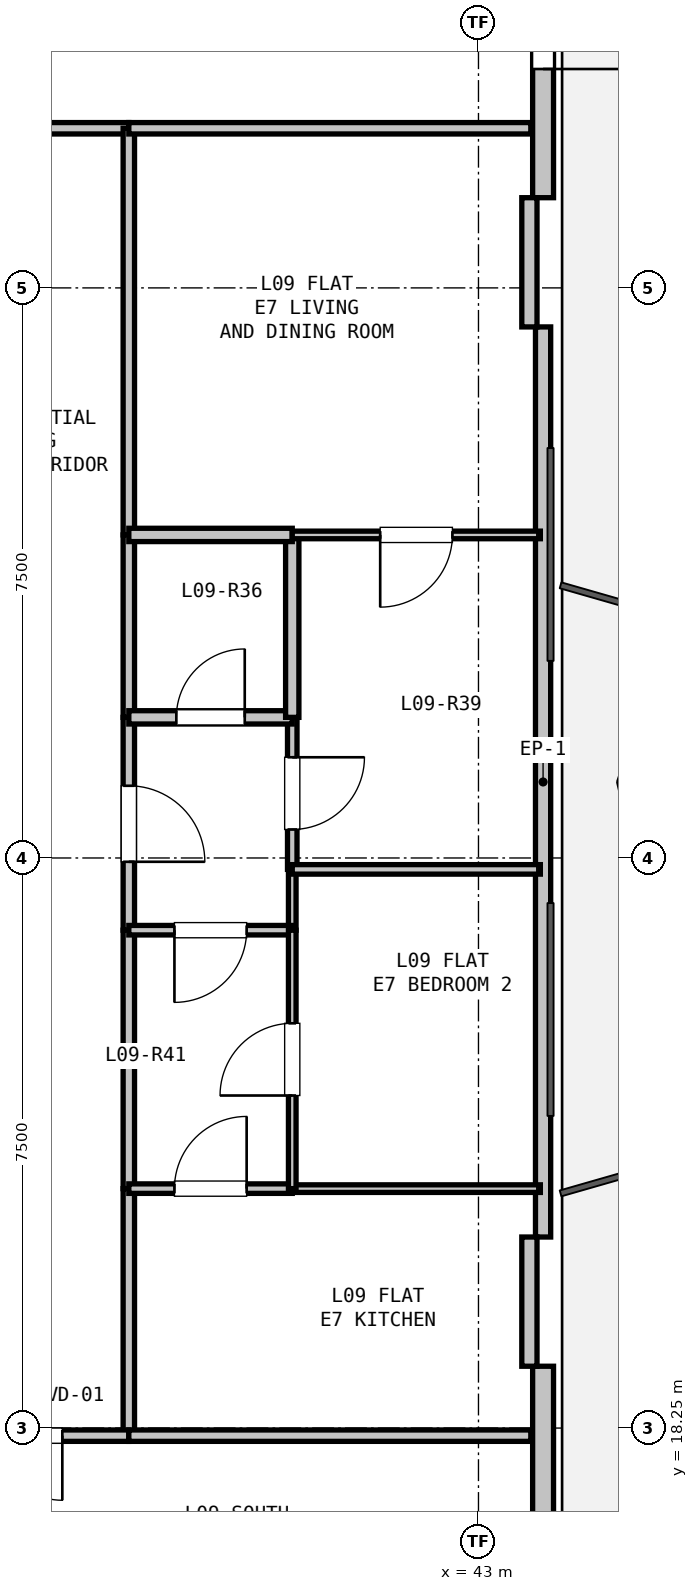
"""IFC4 building model, lengths in metres.
Left out: names, types, materials, properties, quantities, classifications, styles, units other than length and angle.
Written with IfcOpenShell. Run it as: python <this file> out.ifc"""

import sys

from ifc_helpers import new_model, si_unit, direction, frame, frame_2d, origin, place, context, subcontext, project, spatial, rectangle, extrude, element, fill, save


model = new_model("IFC4")
c1 = context("Model", 3, precision=1e-05, world=origin(), true_north=direction((0.0, 1.0)))
c2 = subcontext(c1, "Body", "Model", "MODEL_VIEW")
j1 = project(units=[si_unit("LENGTHUNIT", "METRE"), si_unit("PLANEANGLEUNIT", "RADIAN")], contexts=[c1])
p1 = place(None, origin())
s1 = spatial("IfcSite", under=j1, at=p1, CompositionType="ELEMENT")
p2 = place(p1, origin())
s2 = spatial("IfcBuilding", under=s1, at=p2, CompositionType="ELEMENT")
p3 = place(p2, frame((0.0, 0.0, 35.7)))
s3 = spatial("IfcBuildingStorey", under=s2, at=p3, CompositionType="ELEMENT", Elevation=35.7)
p4 = place(p3, frame((43.85, 47.11, 0.0), z_axis=(0.0, 0.0, 1.0), x_axis=(0.0, -1.0, 0.0)))
e1 = element("IfcWall", 1, at=p4, inside=s3, PredefinedType="SOLIDWALL", context=c2, shape_type="SweptSolid", body=[
    extrude(rectangle(XDim=12.673, YDim=0.275, at=frame_2d((6.336, 0.0))), origin(), (0.0, 0.0, 1.0), 2.66),
])
p5 = place(p4, frame((9.88, 0.0, 0.0)))
e2 = element("IfcOpeningElement", 2, at=p5, cuts=e1, PredefinedType="OPENING", context=c2, shape_type="SweptSolid", body=[
    extrude(rectangle(XDim=1.1, YDim=2.1, at=frame_2d((0.55, 1.05))), frame((0.0, 0.147, 0.0), z_axis=(0.0, -1.0, 0.0), x_axis=(1.0, 0.0, 0.0)), (0.0, 0.0, 1.0), 0.295),
])
p6 = place(p3, frame((43.85, 32.737, 0.0), z_axis=(0.0, 0.0, 1.0), x_axis=(0.0, -1.0, 0.0)))
e3 = element("IfcWall", 3, at=p6, inside=s3, PredefinedType="PARAPET", context=c2, shape_type="SweptSolid", body=[
    extrude(rectangle(XDim=11.973, YDim=0.2, at=frame_2d((5.987, 0.0))), origin(), (0.0, 0.0, 1.0), 0.2),
])
p7 = place(p3, frame((43.85, 19.063, 0.0), z_axis=(0.0, 0.0, 1.0), x_axis=(0.0, -1.0, 0.0)))
e4 = element("IfcWall", 4, at=p7, inside=s3, PredefinedType="SOLIDWALL", context=c2, shape_type="SweptSolid", body=[
    extrude(rectangle(XDim=12.673, YDim=0.275, at=frame_2d((6.336, 0.0))), origin(), (0.0, 0.0, 1.0), 2.66),
])
for number, where, z_axis, x_axis in (
    (5, (43.67, 34.437, 0.0), (0.0, 0.0, 1.0), (0.0, -1.0, 0.0)),
    (6, (43.67, 20.763, 0.0), (0.0, 0.0, 1.0), (0.0, -1.0, 0.0)),
):
    element("IfcWall", number, at=place(p3, frame(where, z_axis=z_axis, x_axis=x_axis)), inside=s3, PredefinedType="PARAPET", context=c2, shape_type="SweptSolid", body=[
        extrude(rectangle(XDim=1.7, YDim=0.2, at=frame_2d((0.85, 0.0))), origin(), (0.0, 0.0, 1.0), 2.66),
    ])
p8 = place(p3, frame((35.8, 35.35, 0.0), z_axis=(0.0, 0.0, 1.0), x_axis=(1.0, 0.0, 0.0)))
e7 = element("IfcWall", 7, at=p8, inside=s3, PredefinedType="PARTITIONING", context=c2, shape_type="SweptSolid", body=[
    extrude(rectangle(XDim=2.6, YDim=0.15, at=frame_2d((1.3, 0.0))), origin(), (0.0, 0.0, 1.0), 2.338),
])
p9 = place(p3, frame((38.4, 35.35, 0.0), z_axis=(0.0, 0.0, 1.0), x_axis=(0.0, -1.0, 0.0)))
e8 = element("IfcWall", 8, at=p9, inside=s3, PredefinedType="PARTITIONING", context=c2, shape_type="SweptSolid", body=[
    extrude(rectangle(XDim=5.35, YDim=0.15, at=frame_2d((2.675, 0.0))), origin(), (0.0, 0.0, 1.0), 2.338),
])
p10 = place(p3, frame((38.4, 30.0, 0.0), z_axis=(0.0, 0.0, 1.0), x_axis=(0.0, -1.0, 0.0)))
e9 = element("IfcWall", 9, at=p10, inside=s3, PredefinedType="PARTITIONING", context=c2, shape_type="SweptSolid", body=[
    extrude(rectangle(XDim=2.4, YDim=0.15, at=frame_2d((1.2, 0.0))), origin(), (0.0, 0.0, 1.0), 3.04),
])
p11 = place(p3, frame((38.4, 27.6, 0.0), z_axis=(0.0, 0.0, 1.0), x_axis=(0.0, -1.0, 0.0)))
e10 = element("IfcWall", 10, at=p11, inside=s3, PredefinedType="PARTITIONING", context=c2, shape_type="SweptSolid", body=[
    extrude(rectangle(XDim=2.8, YDim=0.15, at=frame_2d((1.4, 0.0))), origin(), (0.0, 0.0, 1.0), 3.04),
])
p12 = place(p11, frame((0.9, 0.0, 0.0)))
e11 = element("IfcOpeningElement", 11, at=p12, cuts=e10, PredefinedType="OPENING", context=c2, shape_type="SweptSolid", body=[
    extrude(rectangle(XDim=1.0, YDim=2.15, at=frame_2d((0.5, 1.075))), frame((0.0, 0.085, 0.0), z_axis=(0.0, -1.0, 0.0), x_axis=(1.0, 0.0, 0.0)), (0.0, 0.0, 1.0), 0.17),
])
p13 = place(p3, frame((38.4, 24.8, 0.0), z_axis=(0.0, 0.0, 1.0), x_axis=(0.0, -1.0, 0.0)))
e12 = element("IfcWall", 12, at=p13, inside=s3, PredefinedType="PARTITIONING", context=c2, shape_type="SweptSolid", body=[
    extrude(rectangle(XDim=3.4, YDim=0.15, at=frame_2d((1.7, 0.0))), origin(), (0.0, 0.0, 1.0), 3.04),
])
p14 = place(p3, frame((38.4, 21.4, 0.0), z_axis=(0.0, 0.0, 1.0), x_axis=(0.0, -1.0, 0.0)))
e13 = element("IfcWall", 13, at=p14, inside=s3, PredefinedType="PARTITIONING", context=c2, shape_type="SweptSolid", body=[
    extrude(rectangle(XDim=3.25, YDim=0.15, at=frame_2d((1.625, 0.0))), origin(), (0.0, 0.0, 1.0), 3.04),
])
p15 = place(p3, frame((38.4, 18.15, 0.0), z_axis=(0.0, 0.0, 1.0), x_axis=(-1.0, 0.0, 0.0)))
e14 = element("IfcWall", 14, at=p15, inside=s3, PredefinedType="PARTITIONING", context=c2, shape_type="SweptSolid", body=[
    extrude(rectangle(XDim=2.6, YDim=0.15, at=frame_2d((1.3, 0.0))), origin(), (0.0, 0.0, 1.0), 2.338),
])
p16 = place(p15, frame((0.875, 0.0, 0.0)))
e15 = element("IfcOpeningElement", 15, at=p16, cuts=e14, PredefinedType="OPENING", context=c2, shape_type="SweptSolid", body=[
    extrude(rectangle(XDim=0.85, YDim=2.1, at=frame_2d((0.425, 1.05))), frame((0.0, 0.085, 0.0), z_axis=(0.0, -1.0, 0.0), x_axis=(1.0, 0.0, 0.0)), (0.0, 0.0, 1.0), 0.17),
])
p17 = place(p3, frame((40.55, 27.6, 0.0), z_axis=(0.0, 0.0, 1.0), x_axis=(0.0, -1.0, 0.0)))
e16 = element("IfcWall", 16, at=p17, inside=s3, PredefinedType="PARTITIONING", context=c2, shape_type="SweptSolid", body=[
    extrude(rectangle(XDim=2.0, YDim=0.125, at=frame_2d((1.0, 0.0))), origin(), (0.0, 0.0, 1.0), 3.04),
])
p18 = place(p17, frame((0.525, 0.0, 0.0)))
e17 = element("IfcOpeningElement", 17, at=p18, cuts=e16, PredefinedType="OPENING", context=c2, shape_type="SweptSolid", body=[
    extrude(rectangle(XDim=0.95, YDim=2.1, at=frame_2d((0.475, 1.05))), frame((0.0, 0.073, 0.0), z_axis=(0.0, -1.0, 0.0), x_axis=(1.0, 0.0, 0.0)), (0.0, 0.0, 1.0), 0.145),
])
p19 = place(p3, frame((40.55, 25.6, 0.0), z_axis=(0.0, 0.0, 1.0), x_axis=(0.0, -1.0, 0.0)))
e18 = element("IfcWall", 18, at=p19, inside=s3, PredefinedType="PARTITIONING", context=c2, shape_type="SweptSolid", body=[
    extrude(rectangle(XDim=0.8, YDim=0.1, at=frame_2d((0.4, 0.0))), origin(), (0.0, 0.0, 1.0), 3.04),
])
p20 = place(p3, frame((40.55, 24.8, 0.0), z_axis=(0.0, 0.0, 1.0), x_axis=(-1.0, 0.0, 0.0)))
e19 = element("IfcWall", 19, at=p20, inside=s3, PredefinedType="PARTITIONING", context=c2, shape_type="SweptSolid", body=[
    extrude(rectangle(XDim=2.15, YDim=0.125, at=frame_2d((1.075, 0.0))), origin(), (0.0, 0.0, 1.0), 3.04),
])
p21 = place(p20, frame((0.6, 0.0, 0.0)))
e20 = element("IfcOpeningElement", 20, at=p21, cuts=e19, PredefinedType="OPENING", context=c2, shape_type="SweptSolid", body=[
    extrude(rectangle(XDim=0.95, YDim=2.1, at=frame_2d((0.475, 1.05))), frame((0.0, 0.073, 0.0), z_axis=(0.0, -1.0, 0.0), x_axis=(1.0, 0.0, 0.0)), (0.0, 0.0, 1.0), 0.145),
])
p22 = place(p3, frame((38.4, 27.6, 0.0), z_axis=(0.0, 0.0, 1.0), x_axis=(1.0, 0.0, 0.0)))
e21 = element("IfcWall", 21, at=p22, inside=s3, PredefinedType="PLUMBINGWALL", context=c2, shape_type="SweptSolid", body=[
    extrude(rectangle(XDim=2.15, YDim=0.175, at=frame_2d((1.075, 0.0))), origin(), (0.0, 0.0, 1.0), 3.04),
])
p23 = place(p22, frame((0.625, 0.0, 0.0)))
e22 = element("IfcOpeningElement", 22, at=p23, cuts=e21, PredefinedType="OPENING", context=c2, shape_type="SweptSolid", body=[
    extrude(rectangle(XDim=0.9, YDim=2.1, at=frame_2d((0.45, 1.05))), frame((0.0, 0.097, 0.0), z_axis=(0.0, -1.0, 0.0), x_axis=(1.0, 0.0, 0.0)), (0.0, 0.0, 1.0), 0.195),
])
p24 = place(p3, frame((43.688, 35.35, 0.0), z_axis=(0.0, 0.0, 1.0), x_axis=(-1.0, 0.0, 0.0)))
e23 = element("IfcWall", 23, at=p24, inside=s3, PredefinedType="PARTITIONING", context=c2, shape_type="SweptSolid", body=[
    extrude(rectangle(XDim=5.289, YDim=0.15, at=frame_2d((2.644, 0.0))), origin(), (0.0, 0.0, 1.0), 2.338),
])
p25 = place(p3, frame((40.55, 30.0, 0.0), z_axis=(0.0, 0.0, 1.0), x_axis=(0.0, -1.0, 0.0)))
e24 = element("IfcWall", 24, at=p25, inside=s3, PredefinedType="PLUMBINGWALL", context=c2, shape_type="SweptSolid", body=[
    extrude(rectangle(XDim=2.4, YDim=0.175, at=frame_2d((1.2, 0.0))), origin(), (0.0, 0.0, 1.0), 3.04),
])
p26 = place(p3, frame((38.4, 30.0, 0.0), z_axis=(0.0, 0.0, 1.0), x_axis=(1.0, 0.0, 0.0)))
e25 = element("IfcWall", 25, at=p26, inside=s3, PredefinedType="PLUMBINGWALL", context=c2, shape_type="SweptSolid", body=[
    extrude(rectangle(XDim=2.15, YDim=0.175, at=frame_2d((1.075, 0.0))), origin(), (0.0, 0.0, 1.0), 3.04),
])
p27 = place(p3, frame((38.4, 21.4, 0.0), z_axis=(0.0, 0.0, 1.0), x_axis=(1.0, 0.0, 0.0)))
e26 = element("IfcWall", 26, at=p27, inside=s3, PredefinedType="PARTITIONING", context=c2, shape_type="SweptSolid", body=[
    extrude(rectangle(XDim=2.15, YDim=0.125, at=frame_2d((1.075, 0.0))), origin(), (0.0, 0.0, 1.0), 3.04),
])
p28 = place(p27, frame((0.6, 0.0, 0.0)))
e27 = element("IfcOpeningElement", 27, at=p28, cuts=e26, PredefinedType="OPENING", context=c2, shape_type="SweptSolid", body=[
    extrude(rectangle(XDim=0.95, YDim=2.1, at=frame_2d((0.475, 1.05))), frame((0.0, 0.073, 0.0), z_axis=(0.0, -1.0, 0.0), x_axis=(1.0, 0.0, 0.0)), (0.0, 0.0, 1.0), 0.145),
])
p29 = place(p3, frame((40.55, 21.4, 0.0), z_axis=(0.0, 0.0, 1.0), x_axis=(1.0, 0.0, 0.0)))
e28 = element("IfcWall", 28, at=p29, inside=s3, PredefinedType="PARTITIONING", context=c2, shape_type="SweptSolid", body=[
    extrude(rectangle(XDim=3.264, YDim=0.1, at=frame_2d((1.632, 0.0))), origin(), (0.0, 0.0, 1.0), 2.365),
])
p30 = place(p3, frame((43.688, 18.15, 0.0), z_axis=(0.0, 0.0, 1.0), x_axis=(-1.0, 0.0, 0.0)))
e29 = element("IfcWall", 29, at=p30, inside=s3, PredefinedType="PARTITIONING", context=c2, shape_type="SweptSolid", body=[
    extrude(rectangle(XDim=5.289, YDim=0.15, at=frame_2d((2.644, 0.0))), origin(), (0.0, 0.0, 1.0), 2.365),
])
p31 = place(p3, frame((43.814, 30.0, 0.0), z_axis=(0.0, 0.0, 1.0), x_axis=(-1.0, 0.0, 0.0)))
e30 = element("IfcWall", 30, at=p31, inside=s3, PredefinedType="PARTITIONING", context=c2, shape_type="SweptSolid", body=[
    extrude(rectangle(XDim=3.264, YDim=0.1, at=frame_2d((1.632, 0.0))), origin(), (0.0, 0.0, 1.0), 2.365),
])
p32 = place(p31, frame((1.157, 0.0, 0.0)))
e31 = element("IfcOpeningElement", 31, at=p32, cuts=e30, PredefinedType="OPENING", context=c2, shape_type="SweptSolid", body=[
    extrude(rectangle(XDim=0.95, YDim=2.1, at=frame_2d((0.475, 1.05))), frame((0.0, 0.06, 0.0), z_axis=(0.0, -1.0, 0.0), x_axis=(1.0, 0.0, 0.0)), (0.0, 0.0, 1.0), 0.12),
])
p33 = place(p3, frame((43.814, 25.6, 0.0), z_axis=(0.0, 0.0, 1.0), x_axis=(-1.0, 0.0, 0.0)))
e32 = element("IfcWall", 32, at=p33, inside=s3, PredefinedType="PARTITIONING", context=c2, shape_type="SweptSolid", body=[
    extrude(rectangle(XDim=3.264, YDim=0.125, at=frame_2d((1.632, 0.0))), origin(), (0.0, 0.0, 1.0), 2.365),
])
p34 = place(p3, frame((40.55, 21.4, 0.0), z_axis=(0.0, 0.0, 1.0), x_axis=(0.0, 1.0, 0.0)))
e33 = element("IfcWall", 33, at=p34, inside=s3, PredefinedType="PARTITIONING", context=c2, shape_type="SweptSolid", body=[
    extrude(rectangle(XDim=3.4, YDim=0.1, at=frame_2d((1.7, 0.0))), origin(), (0.0, 0.0, 1.0), 3.04),
])
p35 = place(p34, frame((1.225, 0.0, 0.0)))
e34 = element("IfcOpeningElement", 34, at=p35, cuts=e33, PredefinedType="OPENING", context=c2, shape_type="SweptSolid", body=[
    extrude(rectangle(XDim=0.95, YDim=2.1, at=frame_2d((0.475, 1.05))), frame((0.0, 0.06, 0.0), z_axis=(0.0, -1.0, 0.0), x_axis=(1.0, 0.0, 0.0)), (0.0, 0.0, 1.0), 0.12),
])
p36 = place(p5, origin())
e35 = element("IfcDoor", 35, at=p36, inside=s3, OperationType="SINGLE_SWING_RIGHT", PredefinedType="DOOR", context=c2, shape_type="SweptSolid", body=[
    extrude(rectangle(XDim=1.1, YDim=2.1, at=frame_2d((0.55, 1.05))), frame((0.0, 0.025, 0.0), z_axis=(0.0, -1.0, 0.0), x_axis=(1.0, 0.0, 0.0)), (0.0, 0.0, 1.0), 0.05),
])
fill(e2, e35)
p37 = place(p12, origin())
e36 = element("IfcDoor", 36, at=p37, inside=s3, OperationType="SINGLE_SWING_RIGHT", PredefinedType="DOOR", context=c2, shape_type="SweptSolid", body=[
    extrude(rectangle(XDim=1.0, YDim=2.15, at=frame_2d((0.5, 1.075))), frame((0.0, 0.025, 0.0), z_axis=(0.0, -1.0, 0.0), x_axis=(1.0, 0.0, 0.0)), (0.0, 0.0, 1.0), 0.05),
])
fill(e11, e36)
p38 = place(p16, origin())
e37 = element("IfcDoor", 37, at=p38, inside=s3, OperationType="SINGLE_SWING_LEFT", PredefinedType="DOOR", context=c2, shape_type="SweptSolid", body=[
    extrude(rectangle(XDim=0.85, YDim=2.1, at=frame_2d((0.425, 1.05))), frame((0.0, 0.025, 0.0), z_axis=(0.0, -1.0, 0.0), x_axis=(1.0, 0.0, 0.0)), (0.0, 0.0, 1.0), 0.05),
])
fill(e15, e37)
p39 = place(p23, origin())
e38 = element("IfcDoor", 38, at=p39, inside=s3, OperationType="SINGLE_SWING_RIGHT", PredefinedType="DOOR", context=c2, shape_type="SweptSolid", body=[
    extrude(rectangle(XDim=0.9, YDim=2.1, at=frame_2d((0.45, 1.05))), frame((0.0, 0.025, 0.0), z_axis=(0.0, -1.0, 0.0), x_axis=(1.0, 0.0, 0.0)), (0.0, 0.0, 1.0), 0.05),
])
fill(e22, e38)
p40 = place(p18, origin())
e39 = element("IfcDoor", 39, at=p40, inside=s3, OperationType="SINGLE_SWING_LEFT", PredefinedType="DOOR", context=c2, shape_type="SweptSolid", body=[
    extrude(rectangle(XDim=0.95, YDim=2.1, at=frame_2d((0.475, 1.05))), frame((0.0, 0.025, 0.0), z_axis=(0.0, -1.0, 0.0), x_axis=(1.0, 0.0, 0.0)), (0.0, 0.0, 1.0), 0.05),
])
fill(e17, e39)
p41 = place(p21, origin())
e40 = element("IfcDoor", 40, at=p41, inside=s3, OperationType="SINGLE_SWING_RIGHT", PredefinedType="DOOR", context=c2, shape_type="SweptSolid", body=[
    extrude(rectangle(XDim=0.95, YDim=2.1, at=frame_2d((0.475, 1.05))), frame((0.0, 0.025, 0.0), z_axis=(0.0, -1.0, 0.0), x_axis=(1.0, 0.0, 0.0)), (0.0, 0.0, 1.0), 0.05),
])
fill(e20, e40)
p42 = place(p28, origin())
e41 = element("IfcDoor", 41, at=p42, inside=s3, OperationType="SINGLE_SWING_RIGHT", PredefinedType="DOOR", context=c2, shape_type="SweptSolid", body=[
    extrude(rectangle(XDim=0.95, YDim=2.1, at=frame_2d((0.475, 1.05))), frame((0.0, 0.025, 0.0), z_axis=(0.0, -1.0, 0.0), x_axis=(1.0, 0.0, 0.0)), (0.0, 0.0, 1.0), 0.05),
])
fill(e27, e41)
p43 = place(p32, origin())
e42 = element("IfcDoor", 42, at=p43, inside=s3, OperationType="SINGLE_SWING_RIGHT", PredefinedType="DOOR", context=c2, shape_type="SweptSolid", body=[
    extrude(rectangle(XDim=0.95, YDim=2.1, at=frame_2d((0.475, 1.05))), frame((0.0, 0.025, 0.0), z_axis=(0.0, -1.0, 0.0), x_axis=(1.0, 0.0, 0.0)), (0.0, 0.0, 1.0), 0.05),
])
fill(e31, e42)
p44 = place(p35, origin())
e43 = element("IfcDoor", 43, at=p44, inside=s3, OperationType="SINGLE_SWING_LEFT", PredefinedType="DOOR", context=c2, shape_type="SweptSolid", body=[
    extrude(rectangle(XDim=0.95, YDim=2.1, at=frame_2d((0.475, 1.05))), frame((0.0, 0.025, 0.0), z_axis=(0.0, -1.0, 0.0), x_axis=(1.0, 0.0, 0.0)), (0.0, 0.0, 1.0), 0.05),
])
fill(e34, e43)
save(model, sys.argv[1])
